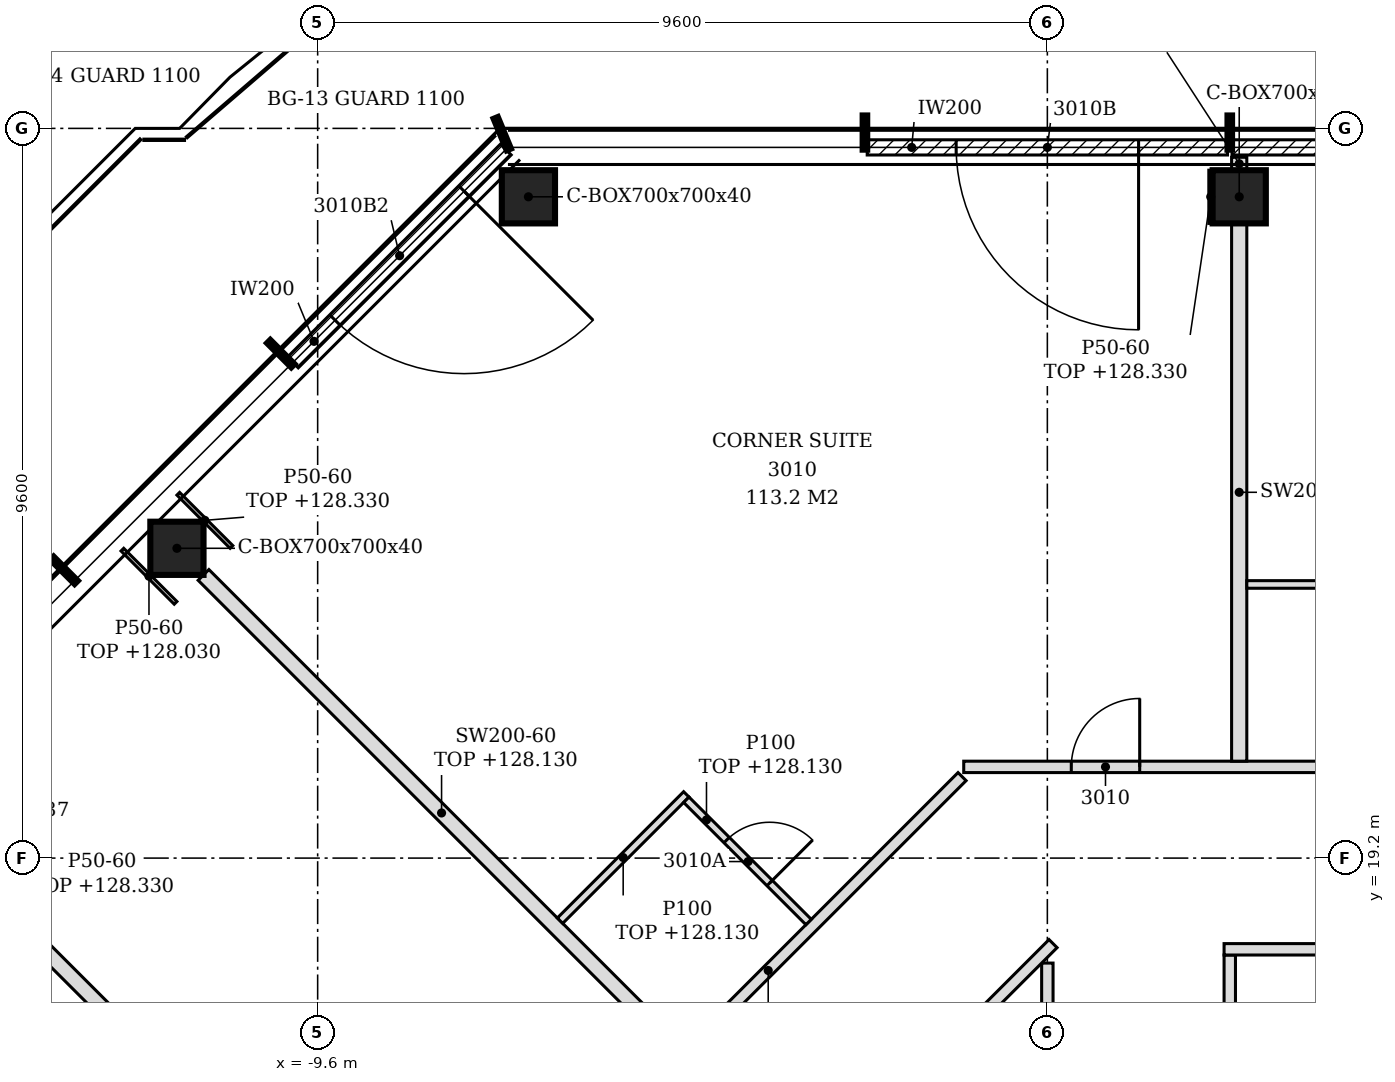
"""IFC4 building model, lengths in metres.
Left out: names, types, materials, properties, quantities, classifications, styles, units other than length and angle.
Written with IfcOpenShell. Run it as: python <this file> out.ifc"""

import sys

from ifc_helpers import new_model, si_unit, direction, frame, frame_2d, origin, origin_2d, place, context, subcontext, project, spatial, polyline, rectangle, hollow_rectangle, outline, extrude, element, fill, save


model = new_model("IFC4")
c1 = context("Model", 3, precision=1e-05, world=origin(), true_north=direction((0.0, 1.0)))
c2 = subcontext(c1, "Body", "Model", "MODEL_VIEW")
j1 = project(units=[si_unit("LENGTHUNIT", "METRE"), si_unit("PLANEANGLEUNIT", "RADIAN")], contexts=[c1])
p1 = place(None, origin())
s1 = spatial("IfcSite", under=j1, at=p1, CompositionType="ELEMENT")
p2 = place(p1, origin())
s2 = spatial("IfcBuilding", under=s1, at=p2, CompositionType="ELEMENT")
p3 = place(p2, frame((0.0, 0.0, 125.4)))
s3 = spatial("IfcBuildingStorey", under=s2, at=p3, CompositionType="ELEMENT", Elevation=125.4)
for number, where, z_axis, x_axis in (
    (1, (2.524, 27.9, -0.15), (0.0, 0.0, 1.0), (1.0, 0.0, 0.0)),
    (2, (-6.827, 27.9, -0.15), (0.0, 0.0, 1.0), (1.0, 0.0, 0.0)),
    (3, (-11.451, 23.276, -0.15), (0.0, 0.0, 1.0), (1.0, 0.0, 0.0)),
):
    element("IfcColumn", number, at=place(p3, frame(where, z_axis=z_axis, x_axis=x_axis)), inside=s3, PredefinedType="COLUMN", context=c2, shape_type="SweptSolid", body=[
        extrude(hollow_rectangle(XDim=0.7, YDim=0.7, WallThickness=0.04, at=origin_2d()), origin(), (0.0, 0.0, 1.0), 3.6),
    ])
p4 = place(p3, frame((7.17, 28.55, 0.0), z_axis=(0.0, 0.0, 1.0), x_axis=(-1.0, 0.0, 0.0)))
e4 = element("IfcWall", 4, at=p4, inside=s3, PredefinedType="NOTDEFINED", context=c2, shape_type="SweptSolid", body=[
    extrude(rectangle(XDim=4.74, YDim=0.2, at=frame_2d((2.37, 0.0))), origin(), (0.0, 0.0, 1.0), 3.45),
])
p5 = place(p4, frame((1.17, 0.0, 0.0)))
e5 = element("IfcOpeningElement", 5, at=p5, cuts=e4, PredefinedType="OPENING", context=c2, shape_type="SweptSolid", body=[
    extrude(rectangle(XDim=2.4, YDim=2.4, at=frame_2d((1.2, 1.2))), frame((0.0, 0.11, 0.0), z_axis=(0.0, -1.0, 0.0), x_axis=(1.0, 0.0, 0.0)), (0.0, 0.0, 1.0), 0.22),
])
p6 = place(p3, frame((2.37, 28.55, 0.0), z_axis=(0.0, 0.0, 1.0), x_axis=(-1.0, 0.0, 0.0)))
e6 = element("IfcWall", 6, at=p6, inside=s3, PredefinedType="NOTDEFINED", context=c2, shape_type="SweptSolid", body=[
    extrude(rectangle(XDim=4.74, YDim=0.2, at=frame_2d((2.37, 0.0))), origin(), (0.0, 0.0, 1.0), 3.45),
])
p7 = place(p6, frame((1.17, 0.0, 0.0)))
e7 = element("IfcOpeningElement", 7, at=p7, cuts=e6, PredefinedType="OPENING", context=c2, shape_type="SweptSolid", body=[
    extrude(rectangle(XDim=2.4, YDim=2.4, at=frame_2d((1.2, 1.2))), frame((0.0, 0.11, 0.0), z_axis=(0.0, -1.0, 0.0), x_axis=(1.0, 0.0, 0.0)), (0.0, 0.0, 1.0), 0.22),
])
p8 = place(p3, frame((-7.125, 28.522, 0.0), z_axis=(0.0, 0.0, 1.0), x_axis=(-0.707106781187, -0.707106781187, 0.0)))
e8 = element("IfcWall", 8, at=p8, inside=s3, PredefinedType="NOTDEFINED", context=c2, shape_type="SweptSolid", body=[
    extrude(rectangle(XDim=3.962, YDim=0.2, at=frame_2d((1.981, 0.0))), origin(), (0.0, 0.0, 1.0), 3.45),
])
p9 = place(p8, frame((0.775, 0.0, 0.0)))
e9 = element("IfcOpeningElement", 9, at=p9, cuts=e8, PredefinedType="OPENING", context=c2, shape_type="SweptSolid", body=[
    extrude(rectangle(XDim=2.4, YDim=2.4, at=frame_2d((1.2, 1.2))), frame((0.0, 0.11, 0.0), z_axis=(0.0, -1.0, 0.0), x_axis=(1.0, 0.0, 0.0)), (0.0, 0.0, 1.0), 0.22),
])
p10 = place(p3, frame((-13.275, 8.119, 0.0), z_axis=(0.0, 0.0, 1.0), x_axis=(0.707099678619, 0.707113883683, 0.0)))
e10 = element("IfcWall", 10, at=p10, inside=s3, PredefinedType="PARTITIONING", context=c2, shape_type="SweptSolid", body=[
    extrude(rectangle(XDim=17.187, YDim=0.15, at=frame_2d((8.593, 0.0))), origin(), (0.0, 0.0, 1.0), 2.73),
])
p11 = place(p10, frame((9.073, 0.0, 0.0)))
e11 = element("IfcOpeningElement", 11, at=p11, cuts=e10, PredefinedType="OPENING", context=c2, shape_type="SweptSolid", body=[
    extrude(rectangle(XDim=0.9, YDim=2.1, at=frame_2d((0.45, 1.05))), frame((0.0, 0.085, 0.0), z_axis=(0.0, -1.0, 0.0), x_axis=(1.0, 0.0, 0.0)), (0.0, 0.0, 1.0), 0.17),
])
p12 = place(p10, frame((5.317, 0.0, 0.0)))
e12 = element("IfcOpeningElement", 12, at=p12, cuts=e10, PredefinedType="OPENING", context=c2, shape_type="SweptSolid", body=[
    extrude(rectangle(XDim=0.9, YDim=2.1, at=frame_2d((0.45, 1.05))), frame((0.0, 0.085, 0.0), z_axis=(0.0, -1.0, 0.0), x_axis=(1.0, 0.0, 0.0)), (0.0, 0.0, 1.0), 0.17),
])
p13 = place(p3, frame((-8.35, 13.15, 0.0), z_axis=(0.0, 0.0, 1.0), x_axis=(-0.707092030896, 0.707121531169, 0.0)))
e13 = element("IfcWall", 13, at=p13, inside=s3, PredefinedType="PARTITIONING", context=c2, shape_type="SweptSolid", body=[
    extrude(rectangle(XDim=8.276, YDim=0.2, at=frame_2d((4.138, 0.0))), origin(), (0.0, 0.0, 1.0), 2.93),
])
p14 = place(p3, frame((0.0, 13.275, 0.0), z_axis=(0.0, 0.0, 1.0), x_axis=(0.0, 1.0, 0.0)))
e14 = element("IfcWall", 14, at=p14, inside=s3, PredefinedType="PARTITIONING", context=c2, shape_type="SweptSolid", body=[
    extrude(outline(polyline([(0.0, 0.0), (4.544, 0.0), (4.544, 3.45), (0.075, 3.45), (0.073, 2.83), (0.0, 2.83), (0.0, 0.0)])), frame((0.0, 0.075, 0.0), z_axis=(0.0, -1.0, 0.0), x_axis=(1.0, 0.0, 0.0)), (0.0, 0.0, 1.0), 0.15),
])
p15 = place(p3, frame((2.4, 13.275, 0.0), z_axis=(0.0, 0.0, 1.0), x_axis=(0.0, 1.0, 0.0)))
e15 = element("IfcWall", 15, at=p15, inside=s3, PredefinedType="PARTITIONING", context=c2, shape_type="SweptSolid", body=[
    extrude(outline(polyline([(0.0, 0.0), (4.65, 0.0), (4.65, 3.45), (0.075, 3.45), (0.073, 2.83), (0.0, 2.83), (0.0, 0.0)])), frame((0.0, 0.075, 0.0), z_axis=(0.0, -1.0, 0.0), x_axis=(1.0, 0.0, 0.0)), (0.0, 0.0, 1.0), 0.15),
])
p16 = place(p3, frame((-4.592, 13.408, 0.0), z_axis=(0.0, 0.0, 1.0), x_axis=(0.707106781187, 0.707106781187, 0.0)))
e16 = element("IfcWall", 16, at=p16, inside=s3, PredefinedType="PARTITIONING", context=c2, shape_type="SweptSolid", body=[
    extrude(rectangle(XDim=6.599, YDim=0.15, at=frame_2d((3.3, 0.0))), origin(), (0.0, 0.0, 1.0), 3.45),
])
p17 = place(p16, frame((2.649, 0.0, 0.0)))
e17 = element("IfcOpeningElement", 17, at=p17, cuts=e16, PredefinedType="OPENING", context=c2, shape_type="SweptSolid", body=[
    extrude(rectangle(XDim=0.9, YDim=2.1, at=frame_2d((0.45, 1.05))), frame((0.0, 0.085, 0.0), z_axis=(0.0, -1.0, 0.0), x_axis=(1.0, 0.0, 0.0)), (0.0, 0.0, 1.0), 0.17),
])
p18 = place(p3, frame((-4.838, 16.662, 0.0), z_axis=(0.0, 0.0, 1.0), x_axis=(-0.707120561855, 0.707093000249, 0.0)))
e18 = element("IfcWall", 18, at=p18, inside=s3, PredefinedType="PARTITIONING", context=c2, shape_type="SweptSolid", body=[
    extrude(rectangle(XDim=8.858, YDim=0.2, at=frame_2d((4.429, 0.0))), origin(), (0.0, 0.0, 1.0), 2.73),
])
p19 = place(p3, frame((2.325, 18.0, 0.0), z_axis=(0.0, 0.0, 1.0), x_axis=(1.0, 0.0, 0.0)))
e19 = element("IfcWall", 19, at=p19, inside=s3, PredefinedType="PARTITIONING", context=c2, shape_type="SweptSolid", body=[
    extrude(outline(polyline([(0.0, 0.0), (12.181, 0.0), (12.181, 3.45), (5.025, 3.45), (5.023, 2.73), (4.725, 2.73), (4.723, 3.45), (0.0, 3.45), (0.0, 0.0)])), frame((0.0, 0.075, 0.0), z_axis=(0.0, -1.0, 0.0), x_axis=(1.0, 0.0, 0.0)), (0.0, 0.0, 1.0), 0.15),
])
p20 = place(p3, frame((-6.411, 18.377, 0.0), z_axis=(0.0, 0.0, 1.0), x_axis=(0.707106781187, 0.707106781187, 0.0)))
e20 = element("IfcWall", 20, at=p20, inside=s3, PredefinedType="PARTITIONING", context=c2, shape_type="SweptSolid", body=[
    extrude(rectangle(XDim=2.35, YDim=0.1, at=frame_2d((1.175, 0.0))), origin(), (0.0, 0.0, 1.0), 2.73),
])
p21 = place(p3, frame((-3.141, 18.359, 0.0), z_axis=(0.0, 0.0, 1.0), x_axis=(-0.707053116953, 0.707160441348, 0.0)))
e21 = element("IfcWall", 21, at=p21, inside=s3, PredefinedType="PARTITIONING", context=c2, shape_type="SweptSolid", body=[
    extrude(rectangle(XDim=2.275, YDim=0.1, at=frame_2d((1.137, 0.0))), origin(), (0.0, 0.0, 1.0), 2.73),
])
p22 = place(p21, frame((0.725, 0.0, 0.0)))
e22 = element("IfcOpeningElement", 22, at=p22, cuts=e21, PredefinedType="OPENING", context=c2, shape_type="SweptSolid", body=[
    extrude(rectangle(XDim=0.8, YDim=2.1, at=frame_2d((0.4, 1.05))), frame((0.0, 0.06, 0.0), z_axis=(0.0, -1.0, 0.0), x_axis=(1.0, 0.0, 0.0)), (0.0, 0.0, 1.0), 0.12),
])
p23 = place(p3, frame((-1.1, 20.4, 0.0), z_axis=(0.0, 0.0, 1.0), x_axis=(1.0, 0.0, 0.0)))
e23 = element("IfcWall", 23, at=p23, inside=s3, PredefinedType="PARTITIONING", context=c2, shape_type="SweptSolid", body=[
    extrude(outline(polyline([(0.0, 0.0), (16.6, 0.0), (16.6, 3.45), (8.45, 3.45), (8.448, 2.73), (8.15, 2.73), (8.148, 3.45), (0.0, 3.45), (0.0, 0.0)])), frame((0.0, 0.075, 0.0), z_axis=(0.0, -1.0, 0.0), x_axis=(1.0, 0.0, 0.0)), (0.0, 0.0, 1.0), 0.15),
])
p24 = place(p23, frame((14.285, 0.0, 0.0)))
e24 = element("IfcOpeningElement", 24, at=p24, cuts=e23, PredefinedType="OPENING", context=c2, shape_type="SweptSolid", body=[
    extrude(rectangle(XDim=0.9, YDim=2.1, at=frame_2d((0.45, 1.05))), frame((0.0, 0.085, 0.0), z_axis=(0.0, -1.0, 0.0), x_axis=(1.0, 0.0, 0.0)), (0.0, 0.0, 1.0), 0.17),
])
p25 = place(p23, frame((9.35, 0.0, 0.0)))
e25 = element("IfcOpeningElement", 25, at=p25, cuts=e23, PredefinedType="OPENING", context=c2, shape_type="SweptSolid", body=[
    extrude(rectangle(XDim=0.9, YDim=2.1, at=frame_2d((0.45, 1.05))), frame((0.0, 0.085, 0.0), z_axis=(0.0, -1.0, 0.0), x_axis=(1.0, 0.0, 0.0)), (0.0, 0.0, 1.0), 0.17),
])
p26 = place(p23, frame((1.415, 0.0, 0.0)))
e26 = element("IfcOpeningElement", 26, at=p26, cuts=e23, PredefinedType="OPENING", context=c2, shape_type="SweptSolid", body=[
    extrude(rectangle(XDim=0.9, YDim=2.1, at=frame_2d((0.45, 1.05))), frame((0.0, 0.085, 0.0), z_axis=(0.0, -1.0, 0.0), x_axis=(1.0, 0.0, 0.0)), (0.0, 0.0, 1.0), 0.17),
])
p27 = place(p3, frame((2.524, 20.475, 0.0), z_axis=(0.0, 0.0, 1.0), x_axis=(0.0, 1.0, 0.0)))
e27 = element("IfcWall", 27, at=p27, inside=s3, PredefinedType="PARTITIONING", context=c2, shape_type="SweptSolid", body=[
    extrude(outline(polyline([(0.0, 0.0), (7.075, 0.0), (7.075, 3.45), (3.63, 3.45), (3.628, 2.88), (3.42, 2.88), (3.418, 3.45), (0.0, 3.45), (0.0, 0.0)])), frame((0.0, 0.1, 0.0), z_axis=(0.0, -1.0, 0.0), x_axis=(1.0, 0.0, 0.0)), (0.0, 0.0, 1.0), 0.2),
])
p28 = place(p3, frame((2.624, 22.8, 0.0), z_axis=(0.0, 0.0, 1.0), x_axis=(1.0, 0.0, 0.0)))
e28 = element("IfcWall", 28, at=p28, inside=s3, PredefinedType="PARTITIONING", context=c2, shape_type="SweptSolid", body=[
    extrude(rectangle(XDim=2.95, YDim=0.1, at=frame_2d((1.475, 0.0))), origin(), (0.0, 0.0, 1.0), 3.45),
])
p29 = place(p28, frame((0.95, 0.0, 0.0)))
e29 = element("IfcOpeningElement", 29, at=p29, cuts=e28, PredefinedType="OPENING", context=c2, shape_type="SweptSolid", body=[
    extrude(rectangle(XDim=0.9, YDim=2.1, at=frame_2d((0.45, 1.05))), frame((0.0, 0.06, 0.0), z_axis=(0.0, -1.0, 0.0), x_axis=(1.0, 0.0, 0.0)), (0.0, 0.0, 1.0), 0.12),
])
p30 = place(p3, frame((2.524, 28.25, 0.0), z_axis=(0.0, 0.0, 1.0), x_axis=(0.0, 1.0, 0.0)))
e30 = element("IfcWall", 30, at=p30, inside=s3, PredefinedType="PARTITIONING", context=c2, shape_type="SweptSolid", body=[
    extrude(rectangle(XDim=0.17, YDim=0.2, at=frame_2d((0.085, 0.0))), origin(), (0.0, 0.0, 1.0), 3.45),
])
p31 = place(p3, frame((-11.469, 22.558, 0.0), z_axis=(0.0, 0.0, 1.0), x_axis=(-0.707106781187, 0.707106781187, 0.0)))
e31 = element("IfcWall", 31, at=p31, inside=s3, PredefinedType="PARTITIONING", context=c2, shape_type="SweptSolid", body=[
    extrude(rectangle(XDim=0.99, YDim=0.05, at=frame_2d((0.495, 0.0))), origin(), (0.0, 0.0, 1.0), 2.63),
])
p32 = place(p3, frame((-10.734, 23.293, 0.0), z_axis=(0.0, 0.0, 1.0), x_axis=(-0.707106781187, 0.707106781187, 0.0)))
e32 = element("IfcWall", 32, at=p32, inside=s3, PredefinedType="PARTITIONING", context=c2, shape_type="SweptSolid", body=[
    extrude(rectangle(XDim=0.99, YDim=0.05, at=frame_2d((0.495, 0.0))), origin(), (0.0, 0.0, 1.0), 2.93),
])
p33 = place(p3, frame((2.149, 27.55, 0.0), z_axis=(0.0, 0.0, 1.0), x_axis=(0.0, 1.0, 0.0)))
e33 = element("IfcWall", 33, at=p33, inside=s3, PredefinedType="PARTITIONING", context=c2, shape_type="SweptSolid", body=[
    extrude(rectangle(XDim=0.7, YDim=0.05, at=frame_2d((0.35, 0.0))), origin(), (0.0, 0.0, 1.0), 2.93),
])
p34 = place(p7, origin())
e34 = element("IfcDoor", 34, at=p34, inside=s3, OperationType="SINGLE_SWING_LEFT", PredefinedType="DOOR", context=c2, shape_type="SweptSolid", body=[
    extrude(rectangle(XDim=2.4, YDim=2.4, at=frame_2d((1.2, 1.2))), frame((0.0, 0.025, 0.0), z_axis=(0.0, -1.0, 0.0), x_axis=(1.0, 0.0, 0.0)), (0.0, 0.0, 1.0), 0.05),
])
fill(e7, e34)
p35 = place(p9, origin())
e35 = element("IfcDoor", 35, at=p35, inside=s3, OperationType="SINGLE_SWING_LEFT", PredefinedType="DOOR", context=c2, shape_type="SweptSolid", body=[
    extrude(rectangle(XDim=2.4, YDim=2.4, at=frame_2d((1.2, 1.2))), frame((0.0, 0.025, 0.0), z_axis=(0.0, -1.0, 0.0), x_axis=(1.0, 0.0, 0.0)), (0.0, 0.0, 1.0), 0.05),
])
fill(e9, e35)
p36 = place(p26, origin())
e36 = element("IfcDoor", 36, at=p36, inside=s3, OperationType="SINGLE_SWING_RIGHT", PredefinedType="DOOR", context=c2, shape_type="SweptSolid", body=[
    extrude(rectangle(XDim=0.9, YDim=2.1, at=frame_2d((0.45, 1.05))), frame((0.0, 0.025, 0.0), z_axis=(0.0, -1.0, 0.0), x_axis=(1.0, 0.0, 0.0)), (0.0, 0.0, 1.0), 0.05),
])
fill(e26, e36)
p37 = place(p22, frame((0.8, 0.0, 0.0), z_axis=(0.0, 0.0, 1.0), x_axis=(-1.0, 0.0, 0.0)))
e37 = element("IfcDoor", 37, at=p37, inside=s3, OperationType="SINGLE_SWING_RIGHT", PredefinedType="DOOR", context=c2, shape_type="SweptSolid", body=[
    extrude(rectangle(XDim=0.8, YDim=2.1, at=frame_2d((0.4, 1.05))), frame((0.0, 0.025, 0.0), z_axis=(0.0, -1.0, 0.0), x_axis=(1.0, 0.0, 0.0)), (0.0, 0.0, 1.0), 0.05),
])
fill(e22, e37)
save(model, sys.argv[1])
